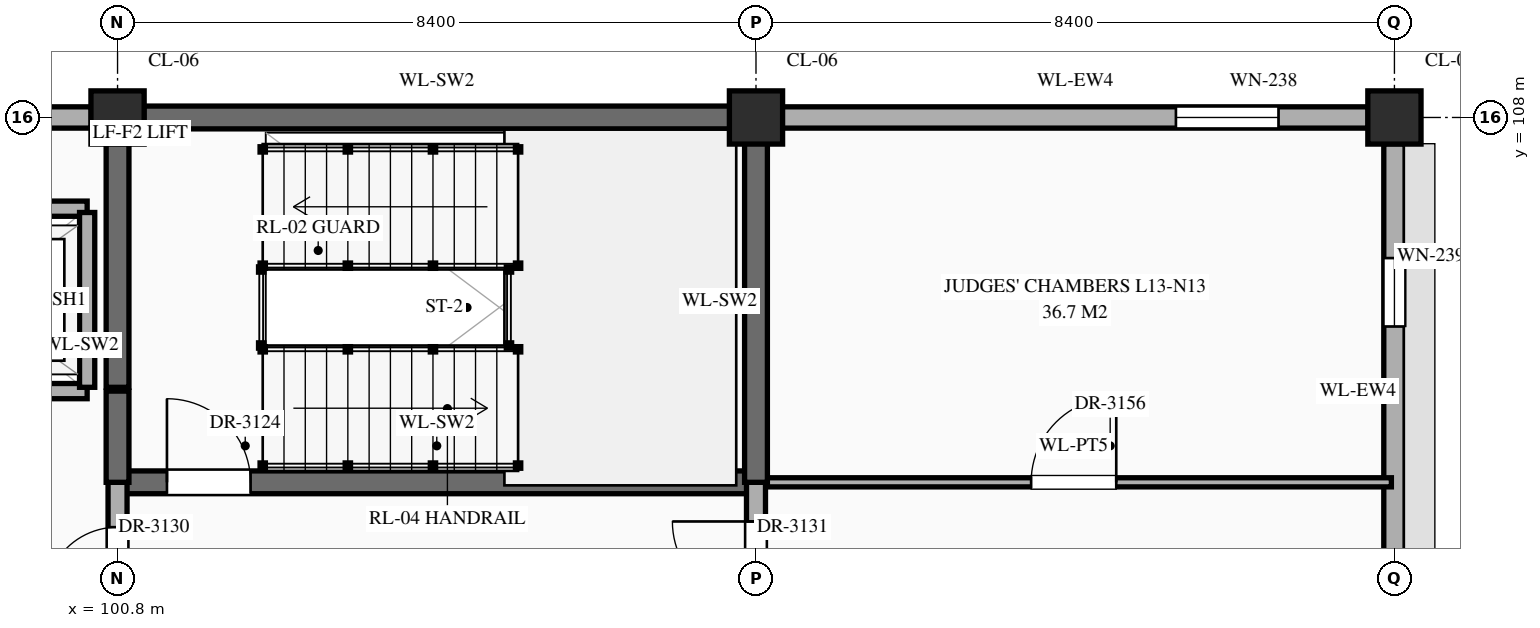
"""IFC4 building model, lengths in metres.
Left out: names, types, materials, properties, quantities, classifications, styles, units other than length and angle.
Written with IfcOpenShell. Run it as: python <this file> out.ifc"""

import sys

from ifc_helpers import new_model, si_unit, direction, frame, frame_2d, origin, origin_2d, place, context, subcontext, project, spatial, rectangle, extrude, element, fill, save


model = new_model("IFC4")
c1 = context("Model", 3, precision=1e-05, world=origin(), true_north=direction((0.0, 1.0)))
c2 = subcontext(c1, "Body", "Model", "MODEL_VIEW")
j1 = project(units=[si_unit("LENGTHUNIT", "METRE"), si_unit("PLANEANGLEUNIT", "RADIAN")], contexts=[c1])
p1 = place(None, origin())
s1 = spatial("IfcSite", under=j1, at=p1, CompositionType="ELEMENT")
p2 = place(p1, origin())
s2 = spatial("IfcBuilding", under=s1, at=p2, CompositionType="ELEMENT")
p3 = place(p2, frame((0.0, 0.0, 56.1)))
s3 = spatial("IfcBuildingStorey", under=s2, at=p3, CompositionType="ELEMENT", Elevation=56.1)
for number, where, z_axis, x_axis in (
    (1, (100.8, 108.0, 0.0), (0.0, 0.0, 1.0), (1.0, 0.0, 0.0)),
    (2, (109.2, 108.0, 0.0), (0.0, 0.0, 1.0), (1.0, 0.0, 0.0)),
    (3, (117.6, 108.0, 0.0), (0.0, 0.0, 1.0), (1.0, 0.0, 0.0)),
):
    element("IfcColumn", number, at=place(p3, frame(where, z_axis=z_axis, x_axis=x_axis)), inside=s3, PredefinedType="COLUMN", context=c2, shape_type="SweptSolid", body=[
        extrude(rectangle(XDim=0.7, YDim=0.7, at=origin_2d()), origin(), (0.0, 0.0, 1.0), 4.2),
    ])
p4 = place(p3, frame((92.745, 108.0, 0.0), z_axis=(0.0, 0.0, 1.0), x_axis=(1.0, 0.0, 0.0)))
e4 = element("IfcWall", 4, at=p4, inside=s3, PredefinedType="STANDARD", context=c2, shape_type="SweptSolid", body=[
    extrude(rectangle(XDim=7.71, YDim=0.28, at=frame_2d((3.855, 0.0))), origin(), (0.0, 0.0, 1.0), 3.31),
])
p5 = place(p3, frame((101.145, 108.0, 0.0), z_axis=(0.0, 0.0, 1.0), x_axis=(1.0, 0.0, 0.0)))
e5 = element("IfcWall", 5, at=p5, inside=s3, PredefinedType="SHEAR", context=c2, shape_type="SweptSolid", body=[
    extrude(rectangle(XDim=7.71, YDim=0.3, at=frame_2d((3.855, 0.0))), origin(), (0.0, 0.0, 1.0), 3.96),
])
p6 = place(p3, frame((109.545, 108.0, 0.0), z_axis=(0.0, 0.0, 1.0), x_axis=(1.0, 0.0, 0.0)))
e6 = element("IfcWall", 6, at=p6, inside=s3, PredefinedType="STANDARD", context=c2, shape_type="SweptSolid", body=[
    extrude(rectangle(XDim=7.71, YDim=0.28, at=frame_2d((3.855, 0.0))), origin(), (0.0, 0.0, 1.0), 3.2),
])
p7 = place(p6, frame((5.18, 0.0, 0.55)))
e7 = element("IfcOpeningElement", 7, at=p7, cuts=e6, PredefinedType="OPENING", context=c2, shape_type="SweptSolid", body=[
    extrude(rectangle(XDim=1.35, YDim=1.2, at=frame_2d((0.675, 0.6))), frame((0.0, 0.152, 0.0), z_axis=(0.0, -1.0, 0.0), x_axis=(1.0, 0.0, 0.0)), (0.0, 0.0, 1.0), 0.304),
])
p8 = place(p3, frame((117.6, 101.145, 0.0), z_axis=(0.0, 0.0, 1.0), x_axis=(0.0, 1.0, 0.0)))
e8 = element("IfcWall", 8, at=p8, inside=s3, PredefinedType="STANDARD", context=c2, shape_type="SweptSolid", body=[
    extrude(rectangle(XDim=6.51, YDim=0.28, at=frame_2d((3.255, 0.0))), origin(), (0.0, 0.0, 1.0), 3.2),
])
p9 = place(p8, frame((4.105, 0.0, 0.55)))
e9 = element("IfcOpeningElement", 9, at=p9, cuts=e8, PredefinedType="OPENING", context=c2, shape_type="SweptSolid", body=[
    extrude(rectangle(XDim=0.9, YDim=1.74, at=frame_2d((0.45, 0.87))), frame((0.0, 0.152, 0.0), z_axis=(0.0, -1.0, 0.0), x_axis=(1.0, 0.0, 0.0)), (0.0, 0.0, 1.0), 0.304),
])
p10 = place(p3, frame((100.8, 103.2, 0.0), z_axis=(0.0, 0.0, 1.0), x_axis=(1.0, 0.0, 0.0)))
e10 = element("IfcWall", 10, at=p10, inside=s3, PredefinedType="SHEAR", context=c2, shape_type="SweptSolid", body=[
    extrude(rectangle(XDim=8.4, YDim=0.3, at=frame_2d((4.2, 0.0))), origin(), (0.0, 0.0, 1.0), 3.96),
])
p11 = place(p10, frame((0.65, 0.0, 0.0)))
e11 = element("IfcOpeningElement", 11, at=p11, cuts=e10, PredefinedType="OPENING", context=c2, shape_type="SweptSolid", body=[
    extrude(rectangle(XDim=1.1, YDim=2.2, at=frame_2d((0.55, 1.1))), frame((0.0, 0.162, 0.0), z_axis=(0.0, -1.0, 0.0), x_axis=(1.0, 0.0, 0.0)), (0.0, 0.0, 1.0), 0.324),
])
p12 = place(p3, frame((109.2, 103.2, 0.0), z_axis=(0.0, 0.0, 1.0), x_axis=(1.0, 0.0, 0.0)))
e12 = element("IfcWall", 12, at=p12, inside=s3, PredefinedType="STANDARD", context=c2, shape_type="SweptSolid", body=[
    extrude(rectangle(XDim=8.36, YDim=0.12, at=frame_2d((4.18, 0.0))), origin(), (0.0, 0.0, 1.0), 3.85),
])
p13 = place(p12, frame((3.62, 0.0, 0.0)))
e13 = element("IfcOpeningElement", 13, at=p13, cuts=e12, PredefinedType="OPENING", context=c2, shape_type="SweptSolid", body=[
    extrude(rectangle(XDim=1.12, YDim=2.25, at=frame_2d((0.56, 1.125))), frame((0.0, 0.072, 0.0), z_axis=(0.0, -1.0, 0.0), x_axis=(1.0, 0.0, 0.0)), (0.0, 0.0, 1.0), 0.144),
])
p14 = place(p3, frame((97.4, 104.4, 0.0), z_axis=(0.0, 0.0, 1.0), x_axis=(1.0, 0.0, 0.0)))
e14 = element("IfcWall", 14, at=p14, inside=s3, PredefinedType="STANDARD", context=c2, shape_type="SweptSolid", body=[
    extrude(rectangle(XDim=3.0, YDim=0.2, at=frame_2d((1.5, 0.0))), origin(), (0.0, 0.0, 1.0), 3.96),
])
p15 = place(p14, frame((0.9, 0.0, 0.0)))
e15 = element("IfcOpeningElement", 15, at=p15, cuts=e14, PredefinedType="OPENING", context=c2, shape_type="SweptSolid", body=[
    extrude(rectangle(XDim=1.2, YDim=2.15, at=frame_2d((0.6, 1.075))), frame((0.0, 0.112, 0.0), z_axis=(0.0, -1.0, 0.0), x_axis=(1.0, 0.0, 0.0)), (0.0, 0.0, 1.0), 0.224),
])
p16 = place(p3, frame((97.4, 106.8, 0.0), z_axis=(0.0, 0.0, 1.0), x_axis=(1.0, 0.0, 0.0)))
e16 = element("IfcWall", 16, at=p16, inside=s3, PredefinedType="STANDARD", context=c2, shape_type="SweptSolid", body=[
    extrude(rectangle(XDim=3.0, YDim=0.2, at=frame_2d((1.5, 0.0))), origin(), (0.0, 0.0, 1.0), 3.96),
])
p17 = place(p3, frame((100.4, 104.45, 0.0), z_axis=(0.0, 0.0, 1.0), x_axis=(0.0, 1.0, 0.0)))
e17 = element("IfcWall", 17, at=p17, inside=s3, PredefinedType="STANDARD", context=c2, shape_type="SweptSolid", body=[
    extrude(rectangle(XDim=2.3, YDim=0.2, at=frame_2d((1.15, 0.0))), origin(), (0.0, 0.0, 1.0), 3.96),
])
p18 = place(p3, frame((100.8, 100.8, 0.0), z_axis=(0.0, 0.0, 1.0), x_axis=(0.0, 1.0, 0.0)))
e18 = element("IfcWall", 18, at=p18, inside=s3, PredefinedType="STANDARD", context=c2, shape_type="SweptSolid", body=[
    extrude(rectangle(XDim=2.4, YDim=0.25, at=frame_2d((1.2, 0.0))), origin(), (0.0, 0.0, 1.0), 3.21),
])
p19 = place(p18, frame((0.86, 0.0, 0.0)))
e19 = element("IfcOpeningElement", 19, at=p19, cuts=e18, PredefinedType="OPENING", context=c2, shape_type="SweptSolid", body=[
    extrude(rectangle(XDim=0.95, YDim=2.15, at=frame_2d((0.475, 1.075))), frame((0.0, 0.137, 0.0), z_axis=(0.0, -1.0, 0.0), x_axis=(1.0, 0.0, 0.0)), (0.0, 0.0, 1.0), 0.274),
])
p20 = place(p3, frame((100.8, 103.2, 0.0), z_axis=(0.0, 0.0, 1.0), x_axis=(0.0, 1.0, 0.0)))
e20 = element("IfcWall", 20, at=p20, inside=s3, PredefinedType="SHEAR", context=c2, shape_type="SweptSolid", body=[
    extrude(rectangle(XDim=1.2, YDim=0.3, at=frame_2d((0.6, 0.0))), origin(), (0.0, 0.0, 1.0), 3.96),
])
p21 = place(p3, frame((100.8, 104.45, 0.0), z_axis=(0.0, 0.0, 1.0), x_axis=(0.0, 1.0, 0.0)))
e21 = element("IfcWall", 21, at=p21, inside=s3, PredefinedType="SHEAR", context=c2, shape_type="SweptSolid", body=[
    extrude(rectangle(XDim=3.46, YDim=0.3, at=frame_2d((1.73, 0.0))), origin(), (0.0, 0.0, 1.0), 3.96),
])
p22 = place(p3, frame((109.2, 100.8, 0.0), z_axis=(0.0, 0.0, 1.0), x_axis=(0.0, 1.0, 0.0)))
e22 = element("IfcWall", 22, at=p22, inside=s3, PredefinedType="STANDARD", context=c2, shape_type="SweptSolid", body=[
    extrude(rectangle(XDim=2.4, YDim=0.25, at=frame_2d((1.2, 0.0))), origin(), (0.0, 0.0, 1.0), 3.1),
])
p23 = place(p22, frame((0.785, 0.0, 0.0)))
e23 = element("IfcOpeningElement", 23, at=p23, cuts=e22, PredefinedType="OPENING", context=c2, shape_type="SweptSolid", body=[
    extrude(rectangle(XDim=1.1, YDim=2.2, at=frame_2d((0.55, 1.1))), frame((0.0, 0.137, 0.0), z_axis=(0.0, -1.0, 0.0), x_axis=(1.0, 0.0, 0.0)), (0.0, 0.0, 1.0), 0.274),
])
p24 = place(p3, frame((109.2, 103.2, 0.0), z_axis=(0.0, 0.0, 1.0), x_axis=(0.0, 1.0, 0.0)))
e24 = element("IfcWall", 24, at=p24, inside=s3, PredefinedType="SHEAR", context=c2, shape_type="SweptSolid", body=[
    extrude(rectangle(XDim=4.76, YDim=0.3, at=frame_2d((2.38, 0.0))), origin(), (0.0, 0.0, 1.0), 3.96),
])
p25 = place(p7, origin())
e25 = element("IfcWindow", 25, at=p25, inside=s3, PartitioningType="SINGLE_PANEL", PredefinedType="WINDOW", context=c2, shape_type="SweptSolid", body=[
    extrude(rectangle(XDim=1.35, YDim=1.2, at=frame_2d((0.675, 0.6))), frame((0.0, 0.03, 0.0), z_axis=(0.0, -1.0, 0.0), x_axis=(1.0, 0.0, 0.0)), (0.0, 0.0, 1.0), 0.06),
])
fill(e7, e25)
p26 = place(p9, origin())
e26 = element("IfcWindow", 26, at=p26, inside=s3, PartitioningType="SINGLE_PANEL", PredefinedType="WINDOW", context=c2, shape_type="SweptSolid", body=[
    extrude(rectangle(XDim=0.9, YDim=1.74, at=frame_2d((0.45, 0.87))), frame((0.0, 0.03, 0.0), z_axis=(0.0, -1.0, 0.0), x_axis=(1.0, 0.0, 0.0)), (0.0, 0.0, 1.0), 0.06),
])
fill(e9, e26)
p27 = place(p11, origin())
e27 = element("IfcDoor", 27, at=p27, inside=s3, OperationType="SINGLE_SWING_LEFT", PredefinedType="DOOR", context=c2, shape_type="SweptSolid", body=[
    extrude(rectangle(XDim=1.1, YDim=2.2, at=frame_2d((0.55, 1.1))), frame((0.0, 0.025, 0.0), z_axis=(0.0, -1.0, 0.0), x_axis=(1.0, 0.0, 0.0)), (0.0, 0.0, 1.0), 0.05),
])
fill(e11, e27)
p28 = place(p19, origin())
e28 = element("IfcDoor", 28, at=p28, inside=s3, OperationType="SINGLE_SWING_LEFT", PredefinedType="DOOR", context=c2, shape_type="SweptSolid", body=[
    extrude(rectangle(XDim=0.95, YDim=2.15, at=frame_2d((0.475, 1.075))), frame((0.0, 0.025, 0.0), z_axis=(0.0, -1.0, 0.0), x_axis=(1.0, 0.0, 0.0)), (0.0, 0.0, 1.0), 0.05),
])
fill(e19, e28)
p29 = place(p23, origin())
e29 = element("IfcDoor", 29, at=p29, inside=s3, OperationType="SINGLE_SWING_RIGHT", PredefinedType="DOOR", context=c2, shape_type="SweptSolid", body=[
    extrude(rectangle(XDim=1.1, YDim=2.2, at=frame_2d((0.55, 1.1))), frame((0.0, 0.025, 0.0), z_axis=(0.0, -1.0, 0.0), x_axis=(1.0, 0.0, 0.0)), (0.0, 0.0, 1.0), 0.05),
])
fill(e23, e29)
p30 = place(p13, origin())
e30 = element("IfcDoor", 30, at=p30, inside=s3, OperationType="SINGLE_SWING_RIGHT", PredefinedType="DOOR", context=c2, shape_type="SweptSolid", body=[
    extrude(rectangle(XDim=1.12, YDim=2.25, at=frame_2d((0.56, 1.125))), frame((0.0, 0.025, 0.0), z_axis=(0.0, -1.0, 0.0), x_axis=(1.0, 0.0, 0.0)), (0.0, 0.0, 1.0), 0.05),
])
fill(e13, e30)
save(model, sys.argv[1])
